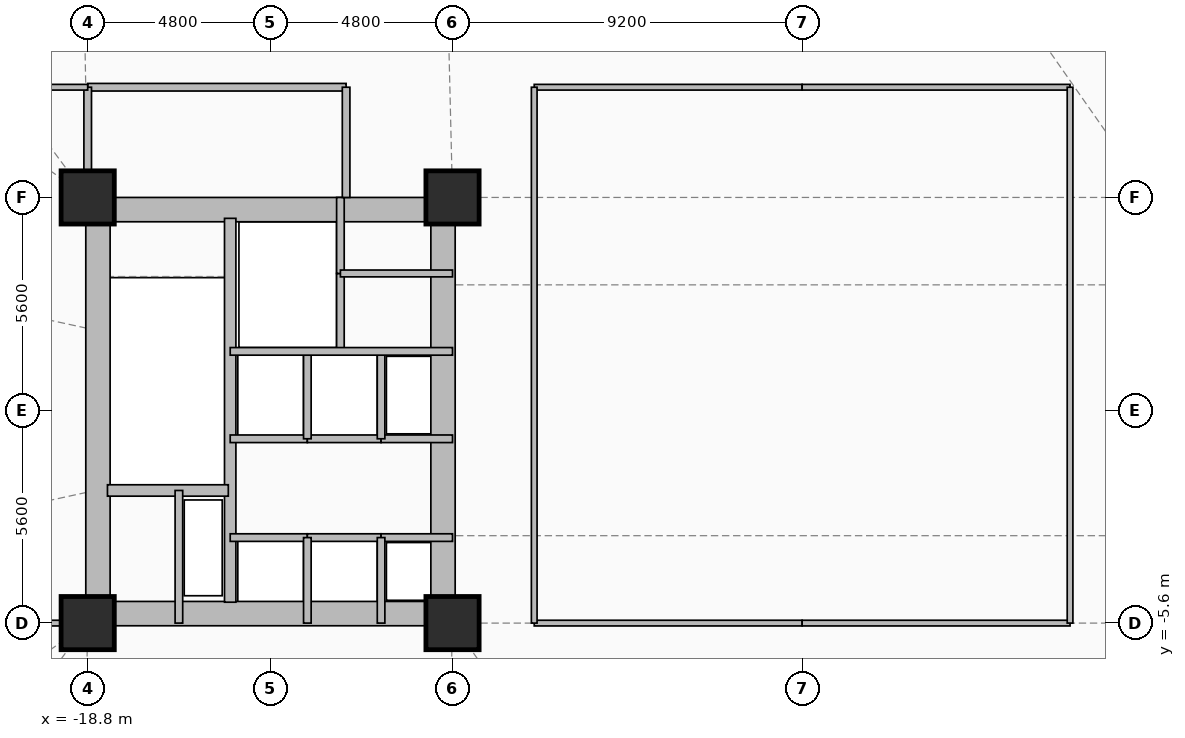
"""IFC4 building model, lengths in metres.
Left out: names, types, materials, properties, quantities, classifications, styles, units other than length and angle.
Written with IfcOpenShell. Run it as: python <this file> out.ifc"""

import sys

from ifc_helpers import new_model, si_unit, direction, frame, frame_2d, origin, origin_2d, place, context, subcontext, project, spatial, rectangle, extrude, element, fill, save


model = new_model("IFC4")
c1 = context("Model", 3, precision=1e-05, world=origin(), true_north=direction((0.0, 1.0)))
c2 = subcontext(c1, "Body", "Model", "MODEL_VIEW")
j1 = project(units=[si_unit("LENGTHUNIT", "METRE"), si_unit("PLANEANGLEUNIT", "RADIAN")], contexts=[c1])
p1 = place(None, origin())
s1 = spatial("IfcSite", under=j1, at=p1, CompositionType="ELEMENT")
p2 = place(p1, origin())
s2 = spatial("IfcBuilding", under=s1, at=p2, CompositionType="ELEMENT")
p3 = place(p2, frame((0.0, 0.0, 22.5)))
s3 = spatial("IfcBuildingStorey", under=s2, at=p3, CompositionType="ELEMENT", Elevation=22.5)
for number, where, z_axis, x_axis in (
    (1, (-18.8, -5.6, 0.0), (0.0, 0.0, 1.0), (1.0, 0.0, 0.0)),
    (2, (-18.8, 5.6, 0.0), (0.0, 0.0, 1.0), (1.0, 0.0, 0.0)),
    (3, (-9.2, -5.6, 0.0), (0.0, 0.0, 1.0), (1.0, 0.0, 0.0)),
    (4, (-9.2, 5.6, 0.0), (0.0, 0.0, 1.0), (1.0, 0.0, 0.0)),
):
    element("IfcColumn", number, at=place(p3, frame(where, z_axis=z_axis, x_axis=x_axis)), inside=s3, PredefinedType="COLUMN", context=c2, shape_type="SweptSolid", body=[
        extrude(rectangle(XDim=1.4, YDim=1.4, at=origin_2d()), origin(), (0.0, 0.0, 1.0), 4.5),
    ])
p4 = place(p3, frame((-18.8, 5.28, 0.0), z_axis=(0.0, 0.0, 1.0), x_axis=(1.0, 0.0, 0.0)))
e5 = element("IfcWall", 5, at=p4, inside=s3, PredefinedType="SHEAR", context=c2, shape_type="SweptSolid", body=[
    extrude(rectangle(XDim=9.6, YDim=0.64, at=frame_2d((4.8, 0.0))), origin(), (0.0, 0.0, 1.0), 4.16),
])
p5 = place(p4, frame((1.55, 0.0, 0.0)))
e6 = element("IfcOpeningElement", 6, at=p5, cuts=e5, PredefinedType="OPENING", context=c2, shape_type="SweptSolid", body=[
    extrude(rectangle(XDim=1.1, YDim=2.15, at=frame_2d((0.55, 1.075))), frame((0.0, 0.33, 0.0), z_axis=(0.0, -1.0, 0.0), x_axis=(1.0, 0.0, 0.0)), (0.0, 0.0, 1.0), 0.66),
])
p6 = place(p4, frame((4.775, 0.0, 0.0)))
e7 = element("IfcOpeningElement", 7, at=p6, cuts=e5, PredefinedType="OPENING", context=c2, shape_type="SweptSolid", body=[
    extrude(rectangle(XDim=1.05, YDim=2.1, at=frame_2d((0.525, 1.05))), frame((0.0, 0.33, 0.0), z_axis=(0.0, -1.0, 0.0), x_axis=(1.0, 0.0, 0.0)), (0.0, 0.0, 1.0), 0.66),
])
p7 = place(p3, frame((-18.8, -5.35, 0.0), z_axis=(0.0, 0.0, 1.0), x_axis=(1.0, 0.0, 0.0)))
e8 = element("IfcWall", 8, at=p7, inside=s3, PredefinedType="SHEAR", context=c2, shape_type="SweptSolid", body=[
    extrude(rectangle(XDim=9.6, YDim=0.64, at=frame_2d((4.8, 0.0))), origin(), (0.0, 0.0, 1.0), 4.16),
])
p8 = place(p7, frame((1.05, 0.0, 0.0)))
e9 = element("IfcOpeningElement", 9, at=p8, cuts=e8, PredefinedType="OPENING", context=c2, shape_type="SweptSolid", body=[
    extrude(rectangle(XDim=0.9, YDim=2.1, at=frame_2d((0.45, 1.05))), frame((0.0, 0.33, 0.0), z_axis=(0.0, -1.0, 0.0), x_axis=(1.0, 0.0, 0.0)), (0.0, 0.0, 1.0), 0.66),
])
p9 = place(p3, frame((-18.53, -5.05, 0.0), z_axis=(0.0, 0.0, 1.0), x_axis=(0.0, 1.0, 0.0)))
e10 = element("IfcWall", 10, at=p9, inside=s3, PredefinedType="SHEAR", context=c2, shape_type="SweptSolid", body=[
    extrude(rectangle(XDim=10.1, YDim=0.64, at=frame_2d((5.05, 0.0))), origin(), (0.0, 0.0, 1.0), 4.16),
])
p10 = place(p3, frame((-9.45, -5.05, 0.0), z_axis=(0.0, 0.0, 1.0), x_axis=(0.0, 1.0, 0.0)))
e11 = element("IfcWall", 11, at=p10, inside=s3, PredefinedType="SHEAR", context=c2, shape_type="SweptSolid", body=[
    extrude(rectangle(XDim=10.1, YDim=0.64, at=frame_2d((5.05, 0.0))), origin(), (0.0, 0.0, 1.0), 4.16),
])
p11 = place(p10, frame((7.175, 0.0, 0.0)))
e12 = element("IfcOpeningElement", 12, at=p11, cuts=e11, PredefinedType="OPENING", context=c2, shape_type="SweptSolid", body=[
    extrude(rectangle(XDim=0.9, YDim=2.1, at=frame_2d((0.45, 1.05))), frame((0.0, 0.33, 0.0), z_axis=(0.0, -1.0, 0.0), x_axis=(1.0, 0.0, 0.0)), (0.0, 0.0, 1.0), 0.66),
])
p12 = place(p10, frame((2.4, 0.0, 0.0)))
e13 = element("IfcOpeningElement", 13, at=p12, cuts=e11, PredefinedType="OPENING", context=c2, shape_type="SweptSolid", body=[
    extrude(rectangle(XDim=1.2, YDim=2.15, at=frame_2d((0.6, 1.075))), frame((0.0, 0.33, 0.0), z_axis=(0.0, -1.0, 0.0), x_axis=(1.0, 0.0, 0.0)), (0.0, 0.0, 1.0), 0.66),
])
p13 = place(p3, frame((-15.05, -5.05, 0.0), z_axis=(0.0, 0.0, 1.0), x_axis=(0.0, 1.0, 0.0)))
e14 = element("IfcWall", 14, at=p13, inside=s3, PredefinedType="SHEAR", context=c2, shape_type="SweptSolid", body=[
    extrude(rectangle(XDim=10.1, YDim=0.3, at=frame_2d((5.05, 0.0))), origin(), (0.0, 0.0, 1.0), 4.16),
])
p14 = place(p3, frame((-18.28, -2.11, 0.0), z_axis=(0.0, 0.0, 1.0), x_axis=(1.0, 0.0, 0.0)))
e15 = element("IfcWall", 15, at=p14, inside=s3, PredefinedType="SHEAR", context=c2, shape_type="SweptSolid", body=[
    extrude(rectangle(XDim=3.18, YDim=0.3, at=frame_2d((1.59, 0.0))), origin(), (0.0, 0.0, 1.0), 4.16),
])
p15 = place(p3, frame((-16.4, -5.6, 0.0), z_axis=(0.0, 0.0, 1.0), x_axis=(0.0, 1.0, 0.0)))
e16 = element("IfcWall", 16, at=p15, inside=s3, PredefinedType="PARTITIONING", context=c2, shape_type="SweptSolid", body=[
    extrude(rectangle(XDim=3.49, YDim=0.2, at=frame_2d((1.745, 0.0))), origin(), (0.0, 0.0, 1.0), 4.16),
])
p16 = place(p3, frame((-12.15, 1.55, 0.0), z_axis=(0.0, 0.0, 1.0), x_axis=(0.0, 1.0, 0.0)))
e17 = element("IfcWall", 17, at=p16, inside=s3, PredefinedType="PARTITIONING", context=c2, shape_type="SweptSolid", body=[
    extrude(rectangle(XDim=2.05, YDim=0.2, at=frame_2d((1.025, 0.0))), origin(), (0.0, 0.0, 1.0), 4.16),
])
p17 = place(p3, frame((-12.15, 3.6, 0.0), z_axis=(0.0, 0.0, 1.0), x_axis=(0.0, 1.0, 0.0)))
e18 = element("IfcWall", 18, at=p17, inside=s3, PredefinedType="PARTITIONING", context=c2, shape_type="SweptSolid", body=[
    extrude(rectangle(XDim=2.0, YDim=0.2, at=frame_2d((1.0, 0.0))), origin(), (0.0, 0.0, 1.0), 4.16),
])
p18 = place(p3, frame((-12.0, 8.5, 0.0), z_axis=(0.0, 0.0, 1.0), x_axis=(-1.0, 0.0, 0.0)))
e19 = element("IfcWall", 19, at=p18, inside=s3, PredefinedType="PARTITIONING", context=c2, shape_type="SweptSolid", body=[
    extrude(rectangle(XDim=6.8, YDim=0.2, at=frame_2d((3.4, 0.0))), origin(), (0.0, 0.0, 1.0), 4.16),
])
p19 = place(p18, frame((1.715, 0.0, 0.0)))
e20 = element("IfcOpeningElement", 20, at=p19, cuts=e19, PredefinedType="OPENING", context=c2, shape_type="SweptSolid", body=[
    extrude(rectangle(XDim=1.1, YDim=2.15, at=frame_2d((0.55, 1.075))), frame((0.0, 0.11, 0.0), z_axis=(0.0, -1.0, 0.0), x_axis=(1.0, 0.0, 0.0)), (0.0, 0.0, 1.0), 0.22),
])
p20 = place(p3, frame((-12.0, 5.6, 0.0), z_axis=(0.0, 0.0, 1.0), x_axis=(0.0, 1.0, 0.0)))
e21 = element("IfcWall", 21, at=p20, inside=s3, PredefinedType="PARTITIONING", context=c2, shape_type="SweptSolid", body=[
    extrude(rectangle(XDim=2.9, YDim=0.2, at=frame_2d((1.45, 0.0))), origin(), (0.0, 0.0, 1.0), 4.16),
])
p21 = place(p3, frame((-18.8, 8.5, 0.0), z_axis=(0.0, 0.0, 1.0), x_axis=(0.0, -1.0, 0.0)))
e22 = element("IfcWall", 22, at=p21, inside=s3, PredefinedType="PARTITIONING", context=c2, shape_type="SweptSolid", body=[
    extrude(rectangle(XDim=2.9, YDim=0.2, at=frame_2d((1.45, 0.0))), origin(), (0.0, 0.0, 1.0), 3.645),
])
p22 = place(p3, frame((-9.2, 3.6, 0.0), z_axis=(0.0, 0.0, 1.0), x_axis=(-1.0, 0.0, 0.0)))
e23 = element("IfcWall", 23, at=p22, inside=s3, PredefinedType="PARTITIONING", context=c2, shape_type="SweptSolid", body=[
    extrude(rectangle(XDim=2.95, YDim=0.18, at=frame_2d((1.475, 0.0))), origin(), (0.0, 0.0, 1.0), 4.16),
])
p23 = place(p22, frame((1.7, 0.0, 0.0)))
e24 = element("IfcOpeningElement", 24, at=p23, cuts=e23, PredefinedType="OPENING", context=c2, shape_type="SweptSolid", body=[
    extrude(rectangle(XDim=0.9, YDim=2.1, at=frame_2d((0.45, 1.05))), frame((0.0, 0.1, 0.0), z_axis=(0.0, -1.0, 0.0), x_axis=(1.0, 0.0, 0.0)), (0.0, 0.0, 1.0), 0.2),
])
p24 = place(p3, frame((-15.05, -3.35, 0.0), z_axis=(0.0, 0.0, 1.0), x_axis=(1.0, 0.0, 0.0)))
e25 = element("IfcWall", 25, at=p24, inside=s3, PredefinedType="PARTITIONING", context=c2, shape_type="SweptSolid", body=[
    extrude(rectangle(XDim=2.03, YDim=0.2, at=frame_2d((1.015, 0.0))), origin(), (0.0, 0.0, 1.0), 4.16),
])
p25 = place(p24, frame((0.49, 0.0, 0.0)))
e26 = element("IfcOpeningElement", 26, at=p25, cuts=e25, PredefinedType="OPENING", context=c2, shape_type="SweptSolid", body=[
    extrude(rectangle(XDim=1.05, YDim=2.1, at=frame_2d((0.525, 1.05))), frame((0.0, 0.11, 0.0), z_axis=(0.0, -1.0, 0.0), x_axis=(1.0, 0.0, 0.0)), (0.0, 0.0, 1.0), 0.22),
])
p26 = place(p3, frame((-13.02, -3.35, 0.0), z_axis=(0.0, 0.0, 1.0), x_axis=(1.0, 0.0, 0.0)))
e27 = element("IfcWall", 27, at=p26, inside=s3, PredefinedType="PARTITIONING", context=c2, shape_type="SweptSolid", body=[
    extrude(rectangle(XDim=1.94, YDim=0.2, at=frame_2d((0.97, 0.0))), origin(), (0.0, 0.0, 1.0), 4.16),
])
p27 = place(p26, frame((0.445, 0.0, 0.0)))
e28 = element("IfcOpeningElement", 28, at=p27, cuts=e27, PredefinedType="OPENING", context=c2, shape_type="SweptSolid", body=[
    extrude(rectangle(XDim=1.05, YDim=2.1, at=frame_2d((0.525, 1.05))), frame((0.0, 0.11, 0.0), z_axis=(0.0, -1.0, 0.0), x_axis=(1.0, 0.0, 0.0)), (0.0, 0.0, 1.0), 0.22),
])
p28 = place(p3, frame((-11.08, -3.35, 0.0), z_axis=(0.0, 0.0, 1.0), x_axis=(1.0, 0.0, 0.0)))
e29 = element("IfcWall", 29, at=p28, inside=s3, PredefinedType="PARTITIONING", context=c2, shape_type="SweptSolid", body=[
    extrude(rectangle(XDim=1.88, YDim=0.2, at=frame_2d((0.94, 0.0))), origin(), (0.0, 0.0, 1.0), 3.875),
])
p29 = place(p3, frame((-13.02, -0.75, 0.0), z_axis=(0.0, 0.0, 1.0), x_axis=(-1.0, 0.0, 0.0)))
e30 = element("IfcWall", 30, at=p29, inside=s3, PredefinedType="PARTITIONING", context=c2, shape_type="SweptSolid", body=[
    extrude(rectangle(XDim=2.03, YDim=0.2, at=frame_2d((1.015, 0.0))), origin(), (0.0, 0.0, 1.0), 4.16),
])
p30 = place(p29, frame((0.49, 0.0, 0.0)))
e31 = element("IfcOpeningElement", 31, at=p30, cuts=e30, PredefinedType="OPENING", context=c2, shape_type="SweptSolid", body=[
    extrude(rectangle(XDim=1.05, YDim=2.1, at=frame_2d((0.525, 1.05))), frame((0.0, 0.11, 0.0), z_axis=(0.0, -1.0, 0.0), x_axis=(1.0, 0.0, 0.0)), (0.0, 0.0, 1.0), 0.22),
])
p31 = place(p3, frame((-11.08, -0.75, 0.0), z_axis=(0.0, 0.0, 1.0), x_axis=(-1.0, 0.0, 0.0)))
e32 = element("IfcWall", 32, at=p31, inside=s3, PredefinedType="PARTITIONING", context=c2, shape_type="SweptSolid", body=[
    extrude(rectangle(XDim=1.94, YDim=0.2, at=frame_2d((0.97, 0.0))), origin(), (0.0, 0.0, 1.0), 4.16),
])
p32 = place(p31, frame((0.445, 0.0, 0.0)))
e33 = element("IfcOpeningElement", 33, at=p32, cuts=e32, PredefinedType="OPENING", context=c2, shape_type="SweptSolid", body=[
    extrude(rectangle(XDim=1.05, YDim=2.1, at=frame_2d((0.525, 1.05))), frame((0.0, 0.11, 0.0), z_axis=(0.0, -1.0, 0.0), x_axis=(1.0, 0.0, 0.0)), (0.0, 0.0, 1.0), 0.22),
])
p33 = place(p3, frame((-9.2, -0.75, 0.0), z_axis=(0.0, 0.0, 1.0), x_axis=(-1.0, 0.0, 0.0)))
e34 = element("IfcWall", 34, at=p33, inside=s3, PredefinedType="PARTITIONING", context=c2, shape_type="SweptSolid", body=[
    extrude(rectangle(XDim=1.88, YDim=0.2, at=frame_2d((0.94, 0.0))), origin(), (0.0, 0.0, 1.0), 4.16),
])
for number, where, z_axis, x_axis in (
    (35, (-13.02, -5.6, 0.0), (0.0, 0.0, 1.0), (0.0, 1.0, 0.0)),
    (36, (-11.08, -5.6, 0.0), (0.0, 0.0, 1.0), (0.0, 1.0, 0.0)),
):
    element("IfcWall", number, at=place(p3, frame(where, z_axis=z_axis, x_axis=x_axis)), inside=s3, PredefinedType="PARTITIONING", context=c2, shape_type="SweptSolid", body=[
        extrude(rectangle(XDim=2.25, YDim=0.2, at=frame_2d((1.125, 0.0))), origin(), (0.0, 0.0, 1.0), 4.16),
    ])
for number, where, z_axis, x_axis in (
    (37, (-13.02, -0.75, 0.0), (0.0, 0.0, 1.0), (0.0, 1.0, 0.0)),
    (38, (-11.08, -0.75, 0.0), (0.0, 0.0, 1.0), (0.0, 1.0, 0.0)),
):
    element("IfcWall", number, at=place(p3, frame(where, z_axis=z_axis, x_axis=x_axis)), inside=s3, PredefinedType="PARTITIONING", context=c2, shape_type="SweptSolid", body=[
        extrude(rectangle(XDim=2.3, YDim=0.2, at=frame_2d((1.15, 0.0))), origin(), (0.0, 0.0, 1.0), 4.16),
    ])
p34 = place(p3, frame((-18.8, 8.5, 0.0), z_axis=(0.0, 0.0, 1.0), x_axis=(-1.0, 0.0, 0.0)))
e39 = element("IfcWall", 39, at=p34, inside=s3, PredefinedType="PARTITIONING", context=c2, shape_type="SweptSolid", body=[
    extrude(rectangle(XDim=5.2, YDim=0.15, at=frame_2d((2.6, 0.0))), origin(), (0.0, 0.0, 1.0), 4.16),
])
p35 = place(p34, frame((3.196, 0.0, 0.0)))
e40 = element("IfcOpeningElement", 40, at=p35, cuts=e39, PredefinedType="OPENING", context=c2, shape_type="SweptSolid", body=[
    extrude(rectangle(XDim=1.05, YDim=2.15, at=frame_2d((0.525, 1.075))), frame((0.0, 0.085, 0.0), z_axis=(0.0, -1.0, 0.0), x_axis=(1.0, 0.0, 0.0)), (0.0, 0.0, 1.0), 0.17),
])
for number, where, z_axis, x_axis in (
    (41, (0.0, 8.5, 0.0), (0.0, 0.0, 1.0), (-1.0, 0.0, 0.0)),
    (42, (7.05, 8.5, 0.0), (0.0, 0.0, 1.0), (-1.0, 0.0, 0.0)),
):
    element("IfcWall", number, at=place(p3, frame(where, z_axis=z_axis, x_axis=x_axis)), inside=s3, PredefinedType="PARTITIONING", context=c2, shape_type="SweptSolid", body=[
        extrude(rectangle(XDim=7.05, YDim=0.15, at=frame_2d((3.525, 0.0))), origin(), (0.0, 0.0, 1.0), 4.16),
    ])
p36 = place(p3, frame((-24.0, -5.6, 0.0), z_axis=(0.0, 0.0, 1.0), x_axis=(1.0, 0.0, 0.0)))
e43 = element("IfcWall", 43, at=p36, inside=s3, PredefinedType="PARTITIONING", context=c2, shape_type="SweptSolid", body=[
    extrude(rectangle(XDim=5.2, YDim=0.15, at=frame_2d((2.6, 0.0))), origin(), (0.0, 0.0, 1.0), 4.16),
])
for number, where, z_axis, x_axis in (
    (44, (-7.05, -5.6, 0.0), (0.0, 0.0, 1.0), (1.0, 0.0, 0.0)),
    (45, (0.0, -5.6, 0.0), (0.0, 0.0, 1.0), (1.0, 0.0, 0.0)),
):
    element("IfcWall", number, at=place(p3, frame(where, z_axis=z_axis, x_axis=x_axis)), inside=s3, PredefinedType="PARTITIONING", context=c2, shape_type="SweptSolid", body=[
        extrude(rectangle(XDim=7.05, YDim=0.15, at=frame_2d((3.525, 0.0))), origin(), (0.0, 0.0, 1.0), 3.137),
    ])
p37 = place(p3, frame((-7.05, 8.5, 0.0), z_axis=(0.0, 0.0, 1.0), x_axis=(0.0, -1.0, 0.0)))
e46 = element("IfcWall", 46, at=p37, inside=s3, PredefinedType="PARTITIONING", context=c2, shape_type="SweptSolid", body=[
    extrude(rectangle(XDim=14.1, YDim=0.15, at=frame_2d((7.05, 0.0))), origin(), (0.0, 0.0, 1.0), 4.16),
])
p38 = place(p37, frame((8.011, 0.0, 0.0)))
e47 = element("IfcOpeningElement", 47, at=p38, cuts=e46, PredefinedType="OPENING", context=c2, shape_type="SweptSolid", body=[
    extrude(rectangle(XDim=1.05, YDim=2.15, at=frame_2d((0.525, 1.075))), frame((0.0, 0.085, 0.0), z_axis=(0.0, -1.0, 0.0), x_axis=(1.0, 0.0, 0.0)), (0.0, 0.0, 1.0), 0.17),
])
p39 = place(p3, frame((7.05, -5.6, 0.0), z_axis=(0.0, 0.0, 1.0), x_axis=(0.0, 1.0, 0.0)))
e48 = element("IfcWall", 48, at=p39, inside=s3, PredefinedType="PARTITIONING", context=c2, shape_type="SweptSolid", body=[
    extrude(rectangle(XDim=14.1, YDim=0.15, at=frame_2d((7.05, 0.0))), origin(), (0.0, 0.0, 1.0), 4.16),
])
p40 = place(p3, frame((-15.05, 1.55, 0.0), z_axis=(0.0, 0.0, 1.0), x_axis=(1.0, 0.0, 0.0)))
e49 = element("IfcWall", 49, at=p40, inside=s3, PredefinedType="PARTITIONING", context=c2, shape_type="SweptSolid", body=[
    extrude(rectangle(XDim=5.85, YDim=0.2, at=frame_2d((2.925, 0.0))), origin(), (0.0, 0.0, 1.0), 4.16),
])
p41 = place(p5, origin())
e50 = element("IfcDoor", 50, at=p41, inside=s3, OperationType="SINGLE_SWING_LEFT", PredefinedType="DOOR", context=c2, shape_type="SweptSolid", body=[
    extrude(rectangle(XDim=1.1, YDim=2.15, at=frame_2d((0.55, 1.075))), frame((0.0, 0.025, 0.0), z_axis=(0.0, -1.0, 0.0), x_axis=(1.0, 0.0, 0.0)), (0.0, 0.0, 1.0), 0.05),
])
fill(e6, e50)
p42 = place(p6, origin())
e51 = element("IfcDoor", 51, at=p42, inside=s3, OperationType="DOUBLE_DOOR_SLIDING", PredefinedType="DOOR", context=c2, shape_type="SweptSolid", body=[
    extrude(rectangle(XDim=1.05, YDim=2.1, at=frame_2d((0.525, 1.05))), frame((0.0, 0.025, 0.0), z_axis=(0.0, -1.0, 0.0), x_axis=(1.0, 0.0, 0.0)), (0.0, 0.0, 1.0), 0.05),
])
fill(e7, e51)
p43 = place(p8, origin())
e52 = element("IfcDoor", 52, at=p43, inside=s3, OperationType="SINGLE_SWING_LEFT", PredefinedType="DOOR", context=c2, shape_type="SweptSolid", body=[
    extrude(rectangle(XDim=0.9, YDim=2.1, at=frame_2d((0.45, 1.05))), frame((0.0, 0.025, 0.0), z_axis=(0.0, -1.0, 0.0), x_axis=(1.0, 0.0, 0.0)), (0.0, 0.0, 1.0), 0.05),
])
fill(e9, e52)
p44 = place(p19, origin())
e53 = element("IfcDoor", 53, at=p44, inside=s3, OperationType="SINGLE_SWING_RIGHT", PredefinedType="DOOR", context=c2, shape_type="SweptSolid", body=[
    extrude(rectangle(XDim=1.1, YDim=2.15, at=frame_2d((0.55, 1.075))), frame((0.0, 0.025, 0.0), z_axis=(0.0, -1.0, 0.0), x_axis=(1.0, 0.0, 0.0)), (0.0, 0.0, 1.0), 0.05),
])
fill(e20, e53)
p45 = place(p23, origin())
e54 = element("IfcDoor", 54, at=p45, inside=s3, OperationType="SINGLE_SWING_LEFT", PredefinedType="DOOR", context=c2, shape_type="SweptSolid", body=[
    extrude(rectangle(XDim=0.9, YDim=2.1, at=frame_2d((0.45, 1.05))), frame((0.0, 0.025, 0.0), z_axis=(0.0, -1.0, 0.0), x_axis=(1.0, 0.0, 0.0)), (0.0, 0.0, 1.0), 0.05),
])
fill(e24, e54)
p46 = place(p11, origin())
e55 = element("IfcDoor", 55, at=p46, inside=s3, OperationType="SINGLE_SWING_RIGHT", PredefinedType="DOOR", context=c2, shape_type="SweptSolid", body=[
    extrude(rectangle(XDim=0.9, YDim=2.1, at=frame_2d((0.45, 1.05))), frame((0.0, 0.025, 0.0), z_axis=(0.0, -1.0, 0.0), x_axis=(1.0, 0.0, 0.0)), (0.0, 0.0, 1.0), 0.05),
])
fill(e12, e55)
p47 = place(p25, origin())
e56 = element("IfcDoor", 56, at=p47, inside=s3, OperationType="DOUBLE_DOOR_SLIDING", PredefinedType="DOOR", context=c2, shape_type="SweptSolid", body=[
    extrude(rectangle(XDim=1.05, YDim=2.1, at=frame_2d((0.525, 1.05))), frame((0.0, 0.025, 0.0), z_axis=(0.0, -1.0, 0.0), x_axis=(1.0, 0.0, 0.0)), (0.0, 0.0, 1.0), 0.05),
])
fill(e26, e56)
p48 = place(p27, origin())
e57 = element("IfcDoor", 57, at=p48, inside=s3, OperationType="DOUBLE_DOOR_SLIDING", PredefinedType="DOOR", context=c2, shape_type="SweptSolid", body=[
    extrude(rectangle(XDim=1.05, YDim=2.1, at=frame_2d((0.525, 1.05))), frame((0.0, 0.025, 0.0), z_axis=(0.0, -1.0, 0.0), x_axis=(1.0, 0.0, 0.0)), (0.0, 0.0, 1.0), 0.05),
])
fill(e28, e57)
p49 = place(p30, origin())
e58 = element("IfcDoor", 58, at=p49, inside=s3, OperationType="DOUBLE_DOOR_SLIDING", PredefinedType="DOOR", context=c2, shape_type="SweptSolid", body=[
    extrude(rectangle(XDim=1.05, YDim=2.1, at=frame_2d((0.525, 1.05))), frame((0.0, 0.025, 0.0), z_axis=(0.0, -1.0, 0.0), x_axis=(1.0, 0.0, 0.0)), (0.0, 0.0, 1.0), 0.05),
])
fill(e31, e58)
p50 = place(p32, origin())
e59 = element("IfcDoor", 59, at=p50, inside=s3, OperationType="DOUBLE_DOOR_SLIDING", PredefinedType="DOOR", context=c2, shape_type="SweptSolid", body=[
    extrude(rectangle(XDim=1.05, YDim=2.1, at=frame_2d((0.525, 1.05))), frame((0.0, 0.025, 0.0), z_axis=(0.0, -1.0, 0.0), x_axis=(1.0, 0.0, 0.0)), (0.0, 0.0, 1.0), 0.05),
])
fill(e33, e59)
p51 = place(p12, origin())
e60 = element("IfcDoor", 60, at=p51, inside=s3, OperationType="SINGLE_SWING_LEFT", PredefinedType="DOOR", context=c2, shape_type="SweptSolid", body=[
    extrude(rectangle(XDim=1.2, YDim=2.15, at=frame_2d((0.6, 1.075))), frame((0.0, 0.025, 0.0), z_axis=(0.0, -1.0, 0.0), x_axis=(1.0, 0.0, 0.0)), (0.0, 0.0, 1.0), 0.05),
])
fill(e13, e60)
p52 = place(p38, origin())
e61 = element("IfcDoor", 61, at=p52, inside=s3, OperationType="SINGLE_SWING_LEFT", PredefinedType="DOOR", context=c2, shape_type="SweptSolid", body=[
    extrude(rectangle(XDim=1.05, YDim=2.15, at=frame_2d((0.525, 1.075))), frame((0.0, 0.025, 0.0), z_axis=(0.0, -1.0, 0.0), x_axis=(1.0, 0.0, 0.0)), (0.0, 0.0, 1.0), 0.05),
])
fill(e47, e61)
save(model, sys.argv[1])
